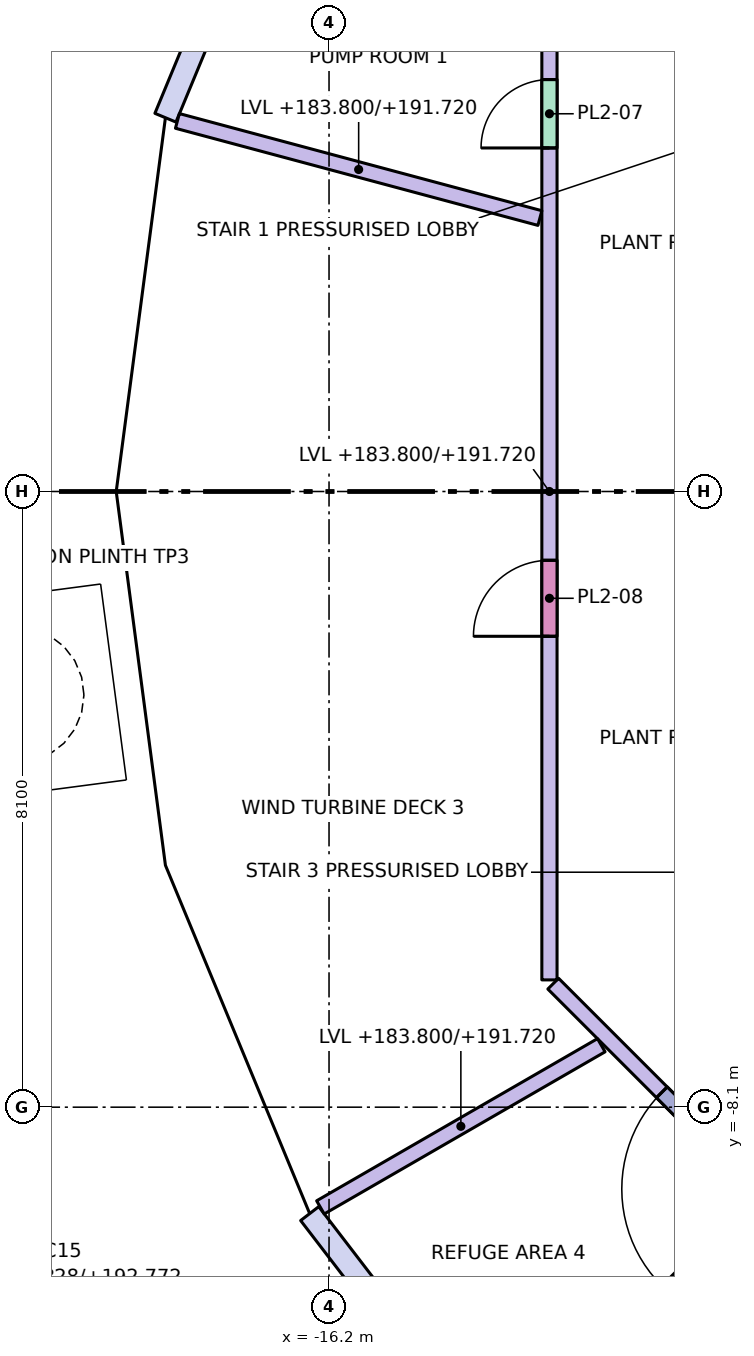
"""IFC4 building model, lengths in metres.
Left out: names, types, materials, properties, quantities, classifications, styles, units other than length and angle.
Written with IfcOpenShell. Run it as: python <this file> out.ifc"""

import sys

from ifc_helpers import new_model, si_unit, direction, frame, frame_2d, origin, place, context, subcontext, project, spatial, rectangle, extrude, element, fill, save


model = new_model("IFC4")
c1 = context("Model", 3, precision=1e-05, world=origin(), true_north=direction((0.0, 1.0)))
c2 = subcontext(c1, "Body", "Model", "MODEL_VIEW")
j1 = project(units=[si_unit("LENGTHUNIT", "METRE"), si_unit("PLANEANGLEUNIT", "RADIAN")], contexts=[c1])
p1 = place(None, origin())
s1 = spatial("IfcSite", under=j1, at=p1, CompositionType="ELEMENT")
p2 = place(p1, origin())
s2 = spatial("IfcBuilding", under=s1, at=p2, CompositionType="ELEMENT")
p3 = place(p2, frame((0.0, 0.0, 183.8)))
s3 = spatial("IfcBuildingStorey", under=s2, at=p3, CompositionType="ELEMENT", Elevation=183.8)
p4 = place(p3, frame((-16.455, 9.5, 0.0), z_axis=(0.0, 0.0, 1.0), x_axis=(-0.382650301762, -0.923893254961, 0.0)))
e1 = element("IfcWall", 1, at=p4, inside=s3, PredefinedType="STANDARD", context=c2, shape_type="SweptSolid", body=[
    extrude(rectangle(XDim=4.96, YDim=0.3, at=frame_2d((2.48, 0.0))), origin(), (0.0, 0.0, 1.0), 8.72),
])
p5 = place(p4, frame((1.98, 0.0, 0.0)))
e2 = element("IfcOpeningElement", 2, at=p5, cuts=e1, PredefinedType="OPENING", context=c2, shape_type="SweptSolid", body=[
    extrude(rectangle(XDim=1.0, YDim=2.4, at=frame_2d((0.5, 1.2))), frame((0.0, 0.16, 0.0), z_axis=(0.0, -1.0, 0.0), x_axis=(1.0, 0.0, 0.0)), (0.0, 0.0, 1.0), 0.32),
])
p6 = place(p3, frame((-16.455, -9.5, 0.0), z_axis=(0.0, 0.0, 1.0), x_axis=(0.608786657876, -0.793333980864, 0.0)))
e3 = element("IfcWall", 3, at=p6, inside=s3, PredefinedType="STANDARD", context=c2, shape_type="SweptSolid", body=[
    extrude(rectangle(XDim=4.56, YDim=0.3, at=frame_2d((2.28, 0.0))), origin(), (0.0, 0.0, 1.0), 8.72),
])
p7 = place(p3, frame((-8.475, -11.25, 0.0), z_axis=(0.0, 0.0, 1.0), x_axis=(-0.707106781187, 0.707106781187, 0.0)))
e4 = element("IfcWall", 4, at=p7, inside=s3, PredefinedType="PARTITIONING", context=c2, shape_type="SweptSolid", body=[
    extrude(rectangle(XDim=6.753, YDim=0.2, at=frame_2d((3.377, 0.0))), origin(), (0.0, 0.0, 1.0), 7.92),
])
p8 = place(p7, frame((2.932, 0.0, 0.0)))
e5 = element("IfcOpeningElement", 5, at=p8, cuts=e4, PredefinedType="OPENING", context=c2, shape_type="SweptSolid", body=[
    extrude(rectangle(XDim=1.8, YDim=2.1, at=frame_2d((0.9, 1.05))), frame((0.0, 0.11, 0.0), z_axis=(0.0, -1.0, 0.0), x_axis=(1.0, 0.0, 0.0)), (0.0, 0.0, 1.0), 0.22),
])
p9 = place(p3, frame((-13.3, -6.426, 0.0), z_axis=(0.0, 0.0, 1.0), x_axis=(0.0, 1.0, 0.0)))
e6 = element("IfcWall", 6, at=p9, inside=s3, PredefinedType="PARTITIONING", context=c2, shape_type="SweptSolid", body=[
    extrude(rectangle(XDim=12.851, YDim=0.2, at=frame_2d((6.426, 0.0))), origin(), (0.0, 0.0, 1.0), 7.92),
])
p10 = place(p9, frame((10.945, 0.0, 0.0)))
e7 = element("IfcOpeningElement", 7, at=p10, cuts=e6, PredefinedType="OPENING", context=c2, shape_type="SweptSolid", body=[
    extrude(rectangle(XDim=0.9, YDim=2.1, at=frame_2d((0.45, 1.05))), frame((0.0, 0.11, 0.0), z_axis=(0.0, -1.0, 0.0), x_axis=(1.0, 0.0, 0.0)), (0.0, 0.0, 1.0), 0.22),
])
p11 = place(p9, frame((4.521, 0.0, 0.0)))
e8 = element("IfcOpeningElement", 8, at=p11, cuts=e6, PredefinedType="OPENING", context=c2, shape_type="SweptSolid", body=[
    extrude(rectangle(XDim=1.0, YDim=2.1, at=frame_2d((0.5, 1.05))), frame((0.0, 0.11, 0.0), z_axis=(0.0, -1.0, 0.0), x_axis=(1.0, 0.0, 0.0)), (0.0, 0.0, 1.0), 0.22),
])
p12 = place(p3, frame((-13.426, 3.597, 0.0), z_axis=(0.0, 0.0, 1.0), x_axis=(-0.9659306159, 0.258801169369, 0.0)))
e9 = element("IfcWall", 9, at=p12, inside=s3, PredefinedType="PARTITIONING", context=c2, shape_type="SweptSolid", body=[
    extrude(rectangle(XDim=4.938, YDim=0.2, at=frame_2d((2.469, 0.0))), origin(), (0.0, 0.0, 1.0), 7.92),
])
p13 = place(p3, frame((-12.618, -7.285, 0.0), z_axis=(0.0, 0.0, 1.0), x_axis=(-0.866005490874, -0.500034488586, 0.0)))
e10 = element("IfcWall", 10, at=p13, inside=s3, PredefinedType="PARTITIONING", context=c2, shape_type="SweptSolid", body=[
    extrude(rectangle(XDim=4.267, YDim=0.2, at=frame_2d((2.133, 0.0))), origin(), (0.0, 0.0, 1.0), 7.92),
])
p14 = place(p3, frame((-9.934, -9.934, 0.0), z_axis=(0.0, 0.0, 1.0), x_axis=(-0.707106781187, -0.707106781187, 0.0)))
e11 = element("IfcWall", 11, at=p14, inside=s3, PredefinedType="PARTITIONING", context=c2, shape_type="SweptSolid", body=[
    extrude(rectangle(XDim=4.789, YDim=0.2, at=frame_2d((2.394, 0.0))), origin(), (0.0, 0.0, 1.0), 8.72),
])
p15 = place(p10, origin())
e12 = element("IfcDoor", 12, at=p15, inside=s3, OperationType="SINGLE_SWING_LEFT", PredefinedType="DOOR", context=c2, shape_type="SweptSolid", body=[
    extrude(rectangle(XDim=0.9, YDim=2.1, at=frame_2d((0.45, 1.05))), frame((0.0, 0.025, 0.0), z_axis=(0.0, -1.0, 0.0), x_axis=(1.0, 0.0, 0.0)), (0.0, 0.0, 1.0), 0.05),
])
fill(e7, e12)
p16 = place(p11, origin())
e13 = element("IfcDoor", 13, at=p16, inside=s3, OperationType="SINGLE_SWING_LEFT", PredefinedType="DOOR", context=c2, shape_type="SweptSolid", body=[
    extrude(rectangle(XDim=1.0, YDim=2.1, at=frame_2d((0.5, 1.05))), frame((0.0, 0.025, 0.0), z_axis=(0.0, -1.0, 0.0), x_axis=(1.0, 0.0, 0.0)), (0.0, 0.0, 1.0), 0.05),
])
fill(e8, e13)
p17 = place(p8, origin())
e14 = element("IfcDoor", 14, at=p17, inside=s3, OperationType="DOUBLE_DOOR_SINGLE_SWING", PredefinedType="DOOR", context=c2, shape_type="SweptSolid", body=[
    extrude(rectangle(XDim=1.8, YDim=2.1, at=frame_2d((0.9, 1.05))), frame((0.0, 0.025, 0.0), z_axis=(0.0, -1.0, 0.0), x_axis=(1.0, 0.0, 0.0)), (0.0, 0.0, 1.0), 0.05),
])
fill(e5, e14)
save(model, sys.argv[1])
